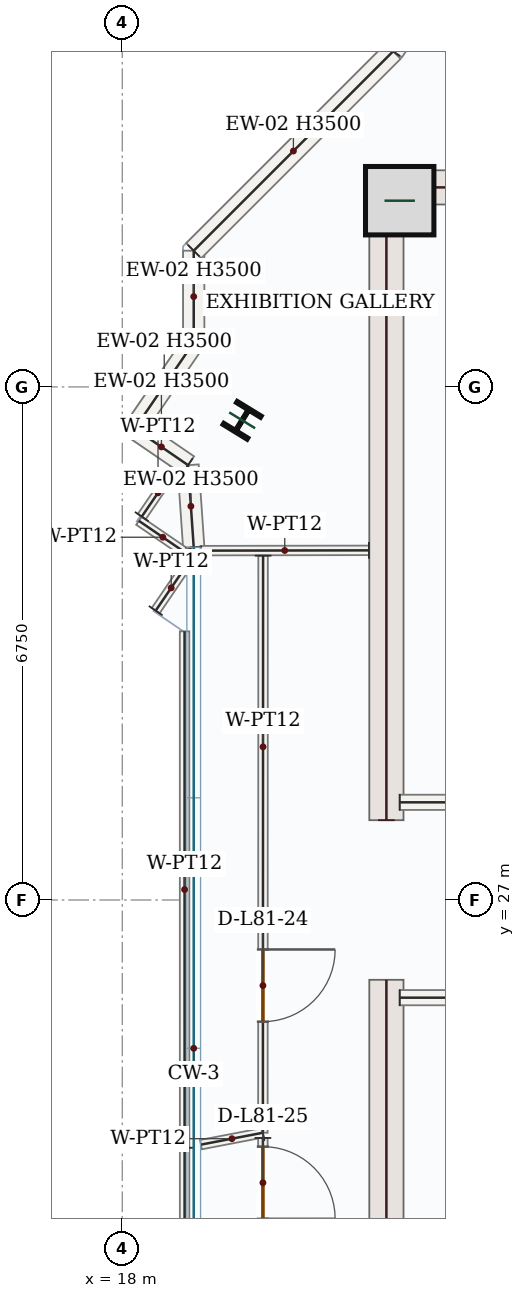
"""IFC4 building model, lengths in metres.
Left out: names, types, materials, properties, quantities, classifications, styles, units other than length and angle.
Written with IfcOpenShell. Run it as: python <this file> out.ifc"""

import sys

from ifc_helpers import new_model, si_unit, direction, frame, frame_2d, origin, origin_2d, place, context, subcontext, project, spatial, rectangle, i_section, extrude, source, transform, mapped, element, fill, save


model = new_model("IFC4")
c1 = context("Model", 3, precision=1e-05, world=origin(), true_north=direction((0.0, 1.0)))
c2 = subcontext(c1, "Body", "Model", "MODEL_VIEW")
j1 = project(units=[si_unit("LENGTHUNIT", "METRE"), si_unit("PLANEANGLEUNIT", "RADIAN")], contexts=[c1])
p1 = place(None, origin())
s1 = spatial("IfcSite", under=j1, at=p1, CompositionType="ELEMENT")
p2 = place(p1, origin())
s2 = spatial("IfcBuilding", under=s1, at=p2, CompositionType="ELEMENT")
p3 = place(p2, frame((0.0, 0.0, 334.8)))
s3 = spatial("IfcBuildingStorey", under=s2, at=p3, CompositionType="ELEMENT", Elevation=334.8)
m1 = source(origin(), c2, "Body", "SweptSolid", [
    extrude(rectangle(XDim=8.55, YDim=0.45, at=frame_2d((4.275, 0.0))), origin(), (0.0, 0.0, 1.0), 3.5),
])
for number, where, z_axis, x_axis in (
    (1, (21.475, 17.4, 0.0), (0.0, 0.0, 1.0), (0.0, 1.0, 0.0)),
    (2, (21.475, 28.05, 0.0), (0.0, 0.0, 1.0), (0.0, 1.0, 0.0)),
):
    element("IfcWall", number, at=place(p3, frame(where, z_axis=z_axis, x_axis=x_axis)), inside=s3, PredefinedType="SHEAR", context=c2, shape_type="MappedRepresentation", body=[
        mapped(m1, transform((0.0, 0.0, 0.0), x_axis=(1.0, 0.0, 0.0), y_axis=(0.0, 1.0, 0.0), z_axis=(0.0, 0.0, 1.0), scale=1.0)),
    ])
m2 = source(origin(), c2, "Body", "SweptSolid", [
    extrude(rectangle(XDim=7.1, YDim=0.45, at=frame_2d((3.55, 0.0))), origin(), (0.0, 0.0, 1.0), 3.5),
])
p4 = place(p3, frame((21.7, 36.375, 0.0), z_axis=(0.0, 0.0, 1.0), x_axis=(1.0, 0.0, 0.0)))
e3 = element("IfcWall", 3, at=p4, inside=s3, PredefinedType="SHEAR", context=c2, shape_type="MappedRepresentation", body=[
    mapped(m2, transform((0.0, 0.0, 0.0), x_axis=(1.0, 0.0, 0.0), y_axis=(0.0, 1.0, 0.0), z_axis=(0.0, 0.0, 1.0), scale=1.0)),
])
m3 = source(origin(), c2, "Body", "SweptSolid", [
    extrude(rectangle(XDim=0.9, YDim=0.9, at=origin_2d()), origin(), (0.0, 0.0, 1.0), 3.75),
])
p5 = place(p3, frame((21.65, 36.2, 0.0), z_axis=(0.0, 0.0, 1.0), x_axis=(1.0, 0.0, 0.0)))
e4 = element("IfcColumn", 4, at=p5, inside=s3, PredefinedType="COLUMN", context=c2, shape_type="MappedRepresentation", body=[
    mapped(m3, transform((0.0, 0.0, 0.0), x_axis=(1.0, 0.0, 0.0), y_axis=(0.0, 1.0, 0.0), z_axis=(0.0, 0.0, 1.0), scale=1.0)),
])
m4 = source(origin(), c2, "Body", "SweptSolid", [
    extrude(i_section(OverallWidth=0.369, OverallDepth=0.356, WebThickness=0.011, FlangeThickness=0.018, FilletRadius=0.018, at=origin_2d()), origin(), (0.0, 0.0, 1.0), 3.75),
])
p6 = place(p3, frame((19.577, 33.311, 0.0), z_axis=(0.0, 0.0, 1.0), x_axis=(-0.852640164354, 0.522498564716, 0.0)))
e5 = element("IfcColumn", 5, at=p6, inside=s3, PredefinedType="COLUMN", context=c2, shape_type="MappedRepresentation", body=[
    mapped(m4, transform((0.0, 0.0, 0.0), x_axis=(1.0, 0.0, 0.0), y_axis=(0.0, 1.0, 0.0), z_axis=(0.0, 0.0, 1.0), scale=1.0)),
])
m5 = source(origin(), c2, "Body", "SweptSolid", [
    extrude(rectangle(XDim=1.083, YDim=0.28, at=frame_2d((0.542, 0.0))), origin(), (0.0, 0.0, 1.0), 3.5),
])
p7 = place(p3, frame((18.94, 31.64, 0.0), z_axis=(0.0, 0.0, 1.0), x_axis=(-0.068717036618, 0.997636190642, 0.0)))
e6 = element("IfcWall", 6, at=p7, inside=s3, PredefinedType="SOLIDWALL", context=c2, shape_type="MappedRepresentation", body=[
    mapped(m5, transform((0.0, 0.0, 0.0), x_axis=(1.0, 0.0, 0.0), y_axis=(0.0, 1.0, 0.0), z_axis=(0.0, 0.0, 1.0), scale=1.0)),
])
m6 = source(origin(), c2, "Body", "SweptSolid", [
    extrude(rectangle(XDim=0.85, YDim=0.28, at=frame_2d((0.425, 0.0))), origin(), (0.0, 0.0, 1.0), 3.5),
])
p8 = place(p3, frame((18.865, 32.721, 0.0), z_axis=(0.0, 0.0, 1.0), x_axis=(-0.825046459993, 0.565064897913, 0.0)))
e7 = element("IfcWall", 7, at=p8, inside=s3, PredefinedType="SOLIDWALL", context=c2, shape_type="MappedRepresentation", body=[
    mapped(m6, transform((0.0, 0.0, 0.0), x_axis=(1.0, 0.0, 0.0), y_axis=(0.0, 1.0, 0.0), z_axis=(0.0, 0.0, 1.0), scale=1.0)),
])
m7 = source(origin(), c2, "Body", "SweptSolid", [
    extrude(rectangle(XDim=1.373, YDim=0.28, at=frame_2d((0.687, 0.0))), origin(), (0.0, 0.0, 1.0), 3.5),
])
p9 = place(p3, frame((18.164, 33.201, 0.0), z_axis=(0.0, 0.0, 1.0), x_axis=(0.564875120833, 0.825176404088, 0.0)))
e8 = element("IfcWall", 8, at=p9, inside=s3, PredefinedType="SOLIDWALL", context=c2, shape_type="MappedRepresentation", body=[
    mapped(m7, transform((0.0, 0.0, 0.0), x_axis=(1.0, 0.0, 0.0), y_axis=(0.0, 1.0, 0.0), z_axis=(0.0, 0.0, 1.0), scale=1.0)),
])
m8 = source(origin(), c2, "Body", "SweptSolid", [
    extrude(rectangle(XDim=1.208, YDim=0.28, at=frame_2d((0.604, 0.0))), origin(), (0.0, 0.0, 1.0), 3.5),
])
p10 = place(p3, frame((18.94, 34.334, 0.0), z_axis=(0.0, 0.0, 1.0), x_axis=(0.0, 1.0, 0.0)))
e9 = element("IfcWall", 9, at=p10, inside=s3, PredefinedType="SOLIDWALL", context=c2, shape_type="MappedRepresentation", body=[
    mapped(m8, transform((0.0, 0.0, 0.0), x_axis=(1.0, 0.0, 0.0), y_axis=(0.0, 1.0, 0.0), z_axis=(0.0, 0.0, 1.0), scale=1.0)),
])
m9 = source(origin(), c2, "Body", "SweptSolid", [
    extrude(rectangle(XDim=3.709, YDim=0.28, at=frame_2d((1.855, 0.0))), origin(), (0.0, 0.0, 1.0), 3.5),
])
p11 = place(p3, frame((18.94, 35.542, 0.0), z_axis=(0.0, 0.0, 1.0), x_axis=(0.707106781187, 0.707106781187, 0.0)))
e10 = element("IfcWall", 10, at=p11, inside=s3, PredefinedType="SOLIDWALL", context=c2, shape_type="MappedRepresentation", body=[
    mapped(m9, transform((0.0, 0.0, 0.0), x_axis=(1.0, 0.0, 0.0), y_axis=(0.0, 1.0, 0.0), z_axis=(0.0, 0.0, 1.0), scale=1.0)),
])
p12 = place(p3, frame((21.563, 38.165, 0.0), z_axis=(0.0, 0.0, 1.0), x_axis=(0.564961879511, 0.825117006672, 0.0)))
e11 = element("IfcWall", 11, at=p12, inside=s3, PredefinedType="SOLIDWALL", context=c2, shape_type="SweptSolid", body=[
    extrude(rectangle(XDim=3.904, YDim=0.28, at=frame_2d((1.952, 0.0))), origin(), (0.0, 0.0, 1.0), 3.5),
])
p13 = place(p12, frame((1.202, 0.0, 0.85)))
e12 = element("IfcOpeningElement", 12, at=p13, cuts=e11, PredefinedType="OPENING", context=c2, shape_type="SweptSolid", body=[
    extrude(rectangle(XDim=1.5, YDim=1.5, at=frame_2d((0.75, 0.75))), frame((0.0, 0.15, 0.0), z_axis=(0.0, -1.0, 0.0), x_axis=(1.0, 0.0, 0.0)), (0.0, 0.0, 1.0), 0.3),
])
m10 = source(origin(), c2, "Body", "SweptSolid", [
    extrude(rectangle(XDim=4.25, YDim=0.2, at=frame_2d((2.125, 0.0))), origin(), (0.0, 0.0, 1.0), 3.5),
])
for number, where, z_axis, x_axis in (
    (13, (21.65, 25.715, 0.0), (0.0, 0.0, 1.0), (1.0, 0.0, 0.0)),
    (14, (21.65, 28.285, 0.0), (0.0, 0.0, 1.0), (1.0, 0.0, 0.0)),
):
    element("IfcWall", number, at=place(p3, frame(where, z_axis=z_axis, x_axis=x_axis)), inside=s3, PredefinedType="SOLIDWALL", context=c2, shape_type="MappedRepresentation", body=[
        mapped(m10, transform((0.0, 0.0, 0.0), x_axis=(1.0, 0.0, 0.0), y_axis=(0.0, 1.0, 0.0), z_axis=(0.0, 0.0, 1.0), scale=1.0)),
    ])
m11 = source(origin(), c2, "Body", "SweptSolid", [
    extrude(rectangle(XDim=2.215, YDim=0.125, at=frame_2d((1.107, 0.0))), origin(), (0.0, 0.0, 1.0), 3.5),
])
p14 = place(p3, frame((21.245, 31.6, 0.0), z_axis=(0.0, 0.0, 1.0), x_axis=(-0.999998633374, -0.001653254657, 0.0)))
e15 = element("IfcWall", 15, at=p14, inside=s3, PredefinedType="PARTITIONING", context=c2, shape_type="MappedRepresentation", body=[
    mapped(m11, transform((0.0, 0.0, 0.0), x_axis=(1.0, 0.0, 0.0), y_axis=(0.0, 1.0, 0.0), z_axis=(0.0, 0.0, 1.0), scale=1.0)),
])
p15 = place(p3, frame((19.853, 31.53, 0.0), z_axis=(0.0, 0.0, 1.0), x_axis=(-0.000321574412, -0.999999948295, 0.0)))
e16 = element("IfcWall", 16, at=p15, inside=s3, PredefinedType="PARTITIONING", context=c2, shape_type="SweptSolid", body=[
    extrude(rectangle(XDim=7.592, YDim=0.125, at=frame_2d((3.796, 0.0))), origin(), (0.0, 0.0, 1.0), 3.5),
])
p16 = place(p15, frame((5.181, 0.0, 0.0)))
e17 = element("IfcOpeningElement", 17, at=p16, cuts=e16, PredefinedType="OPENING", context=c2, shape_type="SweptSolid", body=[
    extrude(rectangle(XDim=0.95, YDim=2.15, at=frame_2d((0.475, 1.075))), frame((0.0, 0.073, 0.0), z_axis=(0.0, -1.0, 0.0), x_axis=(1.0, 0.0, 0.0)), (0.0, 0.0, 1.0), 0.145),
])
m12 = source(origin(), c2, "Body", "SweptSolid", [
    extrude(rectangle(XDim=0.83, YDim=0.125, at=frame_2d((0.415, 0.0))), origin(), (0.0, 0.0, 1.0), 3.5),
])
p17 = place(p3, frame((19.85, 23.938, 0.0), z_axis=(0.0, 0.0, 1.0), x_axis=(-0.98205677528, -0.188585498189, 0.0)))
e18 = element("IfcWall", 18, at=p17, inside=s3, PredefinedType="PARTITIONING", context=c2, shape_type="MappedRepresentation", body=[
    mapped(m12, transform((0.0, 0.0, 0.0), x_axis=(1.0, 0.0, 0.0), y_axis=(0.0, 1.0, 0.0), z_axis=(0.0, 0.0, 1.0), scale=1.0)),
])
m13 = source(origin(), c2, "Body", "SweptSolid", [
    extrude(rectangle(XDim=6.795, YDim=0.125, at=frame_2d((3.397, 0.0))), origin(), (0.0, 0.0, 1.0), 3.5),
])
p18 = place(p3, frame((18.82, 23.74, 0.0), z_axis=(0.0, 0.0, 1.0), x_axis=(-7.1862312e-05, 0.999999997418, 0.0)))
e19 = element("IfcWall", 19, at=p18, inside=s3, PredefinedType="PARTITIONING", context=c2, shape_type="MappedRepresentation", body=[
    mapped(m13, transform((0.0, 0.0, 0.0), x_axis=(1.0, 0.0, 0.0), y_axis=(0.0, 1.0, 0.0), z_axis=(0.0, 0.0, 1.0), scale=1.0)),
])
m14 = source(origin(), c2, "Body", "SweptSolid", [
    extrude(rectangle(XDim=0.725, YDim=0.125, at=frame_2d((0.362, 0.0))), origin(), (0.0, 0.0, 1.0), 3.5),
])
p19 = place(p3, frame((18.44, 30.807, 0.0), z_axis=(0.0, 0.0, 1.0), x_axis=(0.563221841823, 0.826305728464, 0.0)))
e20 = element("IfcWall", 20, at=p19, inside=s3, PredefinedType="PARTITIONING", context=c2, shape_type="MappedRepresentation", body=[
    mapped(m14, transform((0.0, 0.0, 0.0), x_axis=(1.0, 0.0, 0.0), y_axis=(0.0, 1.0, 0.0), z_axis=(0.0, 0.0, 1.0), scale=1.0)),
])
m15 = source(origin(), c2, "Body", "SweptSolid", [
    extrude(rectangle(XDim=0.764, YDim=0.125, at=frame_2d((0.382, 0.0))), origin(), (0.0, 0.0, 1.0), 3.5),
])
p20 = place(p3, frame((18.849, 31.557, 0.0), z_axis=(0.0, 0.0, 1.0), x_axis=(-0.82520537731, 0.564832794071, 0.0)))
e21 = element("IfcWall", 21, at=p20, inside=s3, PredefinedType="PARTITIONING", context=c2, shape_type="MappedRepresentation", body=[
    mapped(m15, transform((0.0, 0.0, 0.0), x_axis=(1.0, 0.0, 0.0), y_axis=(0.0, 1.0, 0.0), z_axis=(0.0, 0.0, 1.0), scale=1.0)),
])
m16 = source(origin(), c2, "Body", "SweptSolid", [
    extrude(rectangle(XDim=0.757, YDim=0.125, at=frame_2d((0.379, 0.0))), origin(), (0.0, 0.0, 1.0), 3.5),
])
p21 = place(p3, frame((18.257, 32.044, 0.0), z_axis=(0.0, 0.0, 1.0), x_axis=(0.564406554972, 0.825496965896, 0.0)))
e22 = element("IfcWall", 22, at=p21, inside=s3, PredefinedType="PARTITIONING", context=c2, shape_type="MappedRepresentation", body=[
    mapped(m16, transform((0.0, 0.0, 0.0), x_axis=(1.0, 0.0, 0.0), y_axis=(0.0, 1.0, 0.0), z_axis=(0.0, 0.0, 1.0), scale=1.0)),
])
p22 = place(p3, frame((19.85, 23.869, 0.0), z_axis=(0.0, 0.0, 1.0), x_axis=(0.000665004009, -0.999999778885, 0.0)))
e23 = element("IfcWall", 23, at=p22, inside=s3, PredefinedType="PARTITIONING", context=c2, shape_type="SweptSolid", body=[
    extrude(rectangle(XDim=1.469, YDim=0.125, at=frame_2d((0.734, 0.0))), origin(), (0.0, 0.0, 1.0), 3.5),
])
p23 = place(p22, frame((0.114, 0.0, 0.0)))
e24 = element("IfcOpeningElement", 24, at=p23, cuts=e23, PredefinedType="OPENING", context=c2, shape_type="SweptSolid", body=[
    extrude(rectangle(XDim=0.95, YDim=2.15, at=frame_2d((0.475, 1.075))), frame((0.0, 0.073, 0.0), z_axis=(0.0, -1.0, 0.0), x_axis=(1.0, 0.0, 0.0)), (0.0, 0.0, 1.0), 0.145),
])
m17 = source(origin(), c2, "Body", "SweptSolid", [
    extrude(rectangle(XDim=5.332, YDim=0.125, at=frame_2d((2.666, 0.0))), origin(), (0.0, 0.0, 1.0), 3.5),
])
p24 = place(p3, frame((18.82, 18.408, 0.0), z_axis=(0.0, 0.0, 1.0), x_axis=(0.0, 1.0, 0.0)))
e25 = element("IfcWall", 25, at=p24, inside=s3, PredefinedType="PARTITIONING", context=c2, shape_type="MappedRepresentation", body=[
    mapped(m17, transform((0.0, 0.0, 0.0), x_axis=(1.0, 0.0, 0.0), y_axis=(0.0, 1.0, 0.0), z_axis=(0.0, 0.0, 1.0), scale=1.0)),
])
m18 = source(origin(), c2, "Body", "SweptSolid", [
    extrude(rectangle(XDim=0.95, YDim=2.15, at=frame_2d((0.475, 1.075))), frame((0.0, 0.025, 0.0), z_axis=(0.0, -1.0, 0.0), x_axis=(1.0, 0.0, 0.0)), (0.0, 0.0, 1.0), 0.05),
])
p25 = place(p16, origin())
e26 = element("IfcDoor", 26, at=p25, inside=s3, OperationType="SINGLE_SWING_LEFT", PredefinedType="DOOR", context=c2, shape_type="MappedRepresentation", body=[
    mapped(m18, transform((0.0, 0.0, 0.0), x_axis=(1.0, 0.0, 0.0), y_axis=(0.0, 1.0, 0.0), z_axis=(0.0, 0.0, 1.0), scale=1.0)),
])
fill(e17, e26)
p26 = place(p23, origin())
e27 = element("IfcDoor", 27, at=p26, inside=s3, OperationType="SINGLE_SWING_RIGHT", PredefinedType="DOOR", context=c2, shape_type="MappedRepresentation", body=[
    mapped(m18, transform((0.0, 0.0, 0.0), x_axis=(1.0, 0.0, 0.0), y_axis=(0.0, 1.0, 0.0), z_axis=(0.0, 0.0, 1.0), scale=1.0)),
])
fill(e24, e27)
save(model, sys.argv[1])
